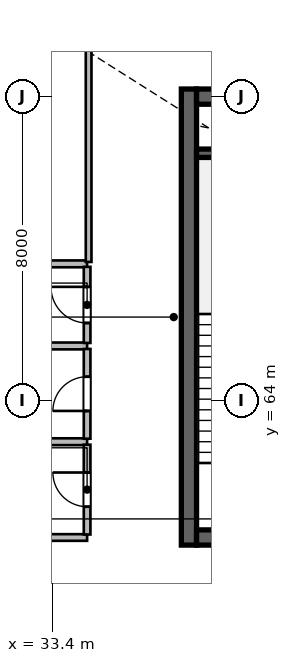
"""IFC4 building model, lengths in metres.
Left out: names, types, materials, properties, quantities, classifications, styles, units other than length and angle.
Written with IfcOpenShell. Run it as: python <this file> out.ifc"""

import sys

from ifc_helpers import new_model, si_unit, direction, frame, frame_2d, origin, place, context, subcontext, project, spatial, rectangle, extrude, source, transform, mapped, element, fill, save


model = new_model("IFC4")
c1 = context("Model", 3, precision=1e-05, world=origin(), true_north=direction((0.0, 1.0)))
c2 = subcontext(c1, "Body", "Model", "MODEL_VIEW")
j1 = project(units=[si_unit("LENGTHUNIT", "METRE"), si_unit("PLANEANGLEUNIT", "RADIAN")], contexts=[c1])
p1 = place(None, origin())
s1 = spatial("IfcSite", under=j1, at=p1, CompositionType="ELEMENT")
p2 = place(p1, origin())
s2 = spatial("IfcBuilding", under=s1, at=p2, CompositionType="ELEMENT")
p3 = place(p2, frame((0.0, 0.0, 312.6)))
s3 = spatial("IfcBuildingStorey", under=s2, at=p3, CompositionType="ELEMENT", Elevation=312.6)
m1 = source(origin(), c2, "Body", "SweptSolid", [
    extrude(rectangle(XDim=12.0, YDim=0.4, at=frame_2d((6.0, 0.0))), origin(), (0.0, 0.0, 1.0), 5.4),
])
p4 = place(p3, frame((37.0, 60.2, 0.0), z_axis=(0.0, 0.0, 1.0), x_axis=(0.0, 1.0, 0.0)))
e1 = element("IfcWall", 1, at=p4, inside=s3, PredefinedType="SHEAR", context=c2, shape_type="MappedRepresentation", body=[
    mapped(m1, transform((0.0, 0.0, 0.0), scale=1.0)),
])
m2 = source(origin(), c2, "Body", "SweptSolid", [
    extrude(rectangle(XDim=21.6, YDim=0.4, at=frame_2d((10.8, 0.0))), origin(), (0.0, 0.0, 1.0), 5.4),
])
p5 = place(p3, frame((37.2, 60.4, 0.0), z_axis=(0.0, 0.0, 1.0), x_axis=(1.0, 0.0, 0.0)))
e2 = element("IfcWall", 2, at=p5, inside=s3, PredefinedType="SHEAR", context=c2, shape_type="MappedRepresentation", body=[
    mapped(m2, transform((0.0, 0.0, 0.0), scale=1.0)),
])
p6 = place(p5, frame((1.1, 0.0, 0.0)))
e3 = element("IfcOpeningElement", 3, at=p6, cuts=e2, PredefinedType="OPENING", context=c2, shape_type="SweptSolid", body=[
    extrude(rectangle(XDim=1.15, YDim=2.15, at=frame_2d((0.575, 1.075))), frame((0.0, 0.21, 0.0), z_axis=(0.0, -1.0, 0.0), x_axis=(1.0, 0.0, 0.0)), (0.0, 0.0, 1.0), 0.42),
])
p7 = place(p5, frame((19.5, 0.0, 0.0)))
e4 = element("IfcOpeningElement", 4, at=p7, cuts=e2, PredefinedType="OPENING", context=c2, shape_type="SweptSolid", body=[
    extrude(rectangle(XDim=0.9, YDim=2.1, at=frame_2d((0.45, 1.05))), frame((0.0, 0.21, 0.0), z_axis=(0.0, -1.0, 0.0), x_axis=(1.0, 0.0, 0.0)), (0.0, 0.0, 1.0), 0.42),
])
p8 = place(p5, frame((12.02, 0.0, 0.0)))
e5 = element("IfcOpeningElement", 5, at=p8, cuts=e2, PredefinedType="OPENING", context=c2, shape_type="SweptSolid", body=[
    extrude(rectangle(XDim=1.6, YDim=2.15, at=frame_2d((0.8, 1.075))), frame((0.0, 0.21, 0.0), z_axis=(0.0, -1.0, 0.0), x_axis=(1.0, 0.0, 0.0)), (0.0, 0.0, 1.0), 0.42),
])
p9 = place(p3, frame((37.2, 72.0, 0.0), z_axis=(0.0, 0.0, 1.0), x_axis=(1.0, 0.0, 0.0)))
e6 = element("IfcWall", 6, at=p9, inside=s3, PredefinedType="SHEAR", context=c2, shape_type="MappedRepresentation", body=[
    mapped(m2, transform((0.0, 0.0, 0.0), scale=1.0)),
])
p10 = place(p9, frame((1.2, 0.0, 0.0)))
e7 = element("IfcOpeningElement", 7, at=p10, cuts=e6, PredefinedType="OPENING", context=c2, shape_type="SweptSolid", body=[
    extrude(rectangle(XDim=0.9, YDim=2.1, at=frame_2d((0.45, 1.05))), frame((0.0, 0.21, 0.0), z_axis=(0.0, -1.0, 0.0), x_axis=(1.0, 0.0, 0.0)), (0.0, 0.0, 1.0), 0.42),
])
p11 = place(p9, frame((14.7, 0.0, 0.0)))
e8 = element("IfcOpeningElement", 8, at=p11, cuts=e6, PredefinedType="OPENING", context=c2, shape_type="SweptSolid", body=[
    extrude(rectangle(XDim=1.2, YDim=2.15, at=frame_2d((0.6, 1.075))), frame((0.0, 0.21, 0.0), z_axis=(0.0, -1.0, 0.0), x_axis=(1.0, 0.0, 0.0)), (0.0, 0.0, 1.0), 0.42),
])
p12 = place(p9, frame((4.15, 0.0, 0.0)))
e9 = element("IfcOpeningElement", 9, at=p12, cuts=e6, PredefinedType="OPENING", context=c2, shape_type="SweptSolid", body=[
    extrude(rectangle(XDim=1.3, YDim=2.15, at=frame_2d((0.65, 1.075))), frame((0.0, 0.21, 0.0), z_axis=(0.0, -1.0, 0.0), x_axis=(1.0, 0.0, 0.0)), (0.0, 0.0, 1.0), 0.42),
])
p13 = place(p9, frame((7.25, 0.0, 0.0)))
e10 = element("IfcOpeningElement", 10, at=p13, cuts=e6, PredefinedType="OPENING", context=c2, shape_type="SweptSolid", body=[
    extrude(rectangle(XDim=0.9, YDim=2.1, at=frame_2d((0.45, 1.05))), frame((0.0, 0.21, 0.0), z_axis=(0.0, -1.0, 0.0), x_axis=(1.0, 0.0, 0.0)), (0.0, 0.0, 1.0), 0.42),
])
m3 = source(origin(), c2, "Body", "SweptSolid", [
    extrude(rectangle(XDim=3.27, YDim=0.22, at=frame_2d((1.635, 0.0))), origin(), (0.0, 0.0, 1.0), 5.4),
])
p14 = place(p3, frame((37.2, 70.51, 0.0), z_axis=(0.0, 0.0, 1.0), x_axis=(1.0, 0.0, 0.0)))
e11 = element("IfcWall", 11, at=p14, inside=s3, PredefinedType="SHEAR", context=c2, shape_type="MappedRepresentation", body=[
    mapped(m3, transform((0.0, 0.0, 0.0), scale=1.0)),
])
m4 = source(origin(), c2, "Body", "SweptSolid", [
    extrude(rectangle(XDim=3.52, YDim=0.175, at=frame_2d((1.76, 0.0))), origin(), (0.0, 0.0, 1.0), 5.12),
])
p15 = place(p3, frame((30.8, 60.4, 0.0), z_axis=(0.0, 0.0, 1.0), x_axis=(1.0, 0.0, 0.0)))
e12 = element("IfcWall", 12, at=p15, inside=s3, PredefinedType="PARTITIONING", context=c2, shape_type="MappedRepresentation", body=[
    mapped(m4, transform((0.0, 0.0, 0.0), scale=1.0)),
])
m5 = source(origin(), c2, "Body", "SweptSolid", [
    extrude(rectangle(XDim=3.52, YDim=0.18, at=frame_2d((1.76, 0.0))), origin(), (0.0, 0.0, 1.0), 5.12),
])
p16 = place(p3, frame((30.8, 62.92, 0.0), z_axis=(0.0, 0.0, 1.0), x_axis=(1.0, 0.0, 0.0)))
e13 = element("IfcWall", 13, at=p16, inside=s3, PredefinedType="PLUMBINGWALL", context=c2, shape_type="MappedRepresentation", body=[
    mapped(m5, transform((0.0, 0.0, 0.0), scale=1.0)),
])
m6 = source(origin(), c2, "Body", "SweptSolid", [
    extrude(rectangle(XDim=2.363, YDim=0.175, at=frame_2d((1.181, 0.0))), origin(), (0.0, 0.0, 1.0), 5.12),
])
p17 = place(p3, frame((34.32, 60.479, 0.0), z_axis=(0.0, 0.0, 1.0), x_axis=(0.0, 1.0, 0.0)))
e14 = element("IfcWall", 14, at=p17, inside=s3, PredefinedType="PARTITIONING", context=c2, shape_type="MappedRepresentation", body=[
    mapped(m6, transform((0.0, 0.0, 0.0), scale=1.0)),
])
p18 = place(p17, frame((0.731, 0.0, 0.0)))
e15 = element("IfcOpeningElement", 15, at=p18, cuts=e14, PredefinedType="OPENING", context=c2, shape_type="SweptSolid", body=[
    extrude(rectangle(XDim=0.9, YDim=2.08, at=frame_2d((0.45, 1.04))), frame((0.0, 0.098, 0.0), z_axis=(0.0, -1.0, 0.0), x_axis=(1.0, 0.0, 0.0)), (0.0, 0.0, 1.0), 0.195),
])
p19 = place(p3, frame((30.8, 65.44, 0.0), z_axis=(0.0, 0.0, 1.0), x_axis=(1.0, 0.0, 0.0)))
e16 = element("IfcWall", 16, at=p19, inside=s3, PredefinedType="PLUMBINGWALL", context=c2, shape_type="MappedRepresentation", body=[
    mapped(m5, transform((0.0, 0.0, 0.0), scale=1.0)),
])
m7 = source(origin(), c2, "Body", "SweptSolid", [
    extrude(rectangle(XDim=2.362, YDim=0.175, at=frame_2d((1.181, 0.0))), origin(), (0.0, 0.0, 1.0), 5.12),
])
p20 = place(p3, frame((34.32, 62.999, 0.0), z_axis=(0.0, 0.0, 1.0), x_axis=(0.0, 1.0, 0.0)))
e17 = element("IfcWall", 17, at=p20, inside=s3, PredefinedType="PARTITIONING", context=c2, shape_type="MappedRepresentation", body=[
    mapped(m7, transform((0.0, 0.0, 0.0), scale=1.0)),
])
p21 = place(p20, frame((0.731, 0.0, 0.0)))
e18 = element("IfcOpeningElement", 18, at=p21, cuts=e17, PredefinedType="OPENING", context=c2, shape_type="SweptSolid", body=[
    extrude(rectangle(XDim=0.9, YDim=2.08, at=frame_2d((0.45, 1.04))), frame((0.0, 0.098, 0.0), z_axis=(0.0, -1.0, 0.0), x_axis=(1.0, 0.0, 0.0)), (0.0, 0.0, 1.0), 0.195),
])
p22 = place(p3, frame((30.8, 67.6, 0.0), z_axis=(0.0, 0.0, 1.0), x_axis=(1.0, 0.0, 0.0)))
e19 = element("IfcWall", 19, at=p22, inside=s3, PredefinedType="PLUMBINGWALL", context=c2, shape_type="MappedRepresentation", body=[
    mapped(m5, transform((0.0, 0.0, 0.0), scale=1.0)),
])
m8 = source(origin(), c2, "Body", "SweptSolid", [
    extrude(rectangle(XDim=2.002, YDim=0.175, at=frame_2d((1.001, 0.0))), origin(), (0.0, 0.0, 1.0), 5.12),
])
p23 = place(p3, frame((34.32, 65.519, 0.0), z_axis=(0.0, 0.0, 1.0), x_axis=(0.0, 1.0, 0.0)))
e20 = element("IfcWall", 20, at=p23, inside=s3, PredefinedType="PARTITIONING", context=c2, shape_type="MappedRepresentation", body=[
    mapped(m8, transform((0.0, 0.0, 0.0), scale=1.0)),
])
p24 = place(p23, frame((0.526, 0.0, 0.0)))
e21 = element("IfcOpeningElement", 21, at=p24, cuts=e20, PredefinedType="OPENING", context=c2, shape_type="SweptSolid", body=[
    extrude(rectangle(XDim=0.95, YDim=2.12, at=frame_2d((0.475, 1.06))), frame((0.0, 0.098, 0.0), z_axis=(0.0, -1.0, 0.0), x_axis=(1.0, 0.0, 0.0)), (0.0, 0.0, 1.0), 0.195),
])
m9 = source(origin(), c2, "Body", "SweptSolid", [
    extrude(rectangle(XDim=6.862, YDim=0.15, at=frame_2d((3.431, 0.0))), origin(), (0.0, 0.0, 1.0), 5.12),
])
p25 = place(p3, frame((34.36, 67.65, 0.0), z_axis=(0.0, 0.0, 1.0), x_axis=(0.0, 1.0, 0.0)))
e22 = element("IfcWall", 22, at=p25, inside=s3, PredefinedType="PARTITIONING", context=c2, shape_type="MappedRepresentation", body=[
    mapped(m9, transform((0.0, 0.0, 0.0), scale=1.0)),
])
m10 = source(origin(), c2, "Body", "SweptSolid", [
    extrude(rectangle(XDim=0.9, YDim=2.08, at=frame_2d((0.45, 1.04))), frame((0.0, 0.025, 0.0), z_axis=(0.0, -1.0, 0.0), x_axis=(1.0, 0.0, 0.0)), (0.0, 0.0, 1.0), 0.05),
])
p26 = place(p18, origin())
e23 = element("IfcDoor", 23, at=p26, inside=s3, OperationType="SINGLE_SWING_RIGHT", PredefinedType="DOOR", context=c2, shape_type="MappedRepresentation", body=[
    mapped(m10, transform((0.0, 0.0, 0.0), scale=1.0)),
])
fill(e15, e23)
p27 = place(p21, origin())
e24 = element("IfcDoor", 24, at=p27, inside=s3, OperationType="SINGLE_SWING_LEFT", PredefinedType="DOOR", context=c2, shape_type="MappedRepresentation", body=[
    mapped(m10, transform((0.0, 0.0, 0.0), scale=1.0)),
])
fill(e18, e24)
m11 = source(origin(), c2, "Body", "SweptSolid", [
    extrude(rectangle(XDim=0.95, YDim=2.12, at=frame_2d((0.475, 1.06))), frame((0.0, 0.025, 0.0), z_axis=(0.0, -1.0, 0.0), x_axis=(1.0, 0.0, 0.0)), (0.0, 0.0, 1.0), 0.05),
])
p28 = place(p24, origin())
e25 = element("IfcDoor", 25, at=p28, inside=s3, OperationType="SINGLE_SWING_RIGHT", PredefinedType="DOOR", context=c2, shape_type="MappedRepresentation", body=[
    mapped(m11, transform((0.0, 0.0, 0.0), scale=1.0)),
])
fill(e21, e25)
save(model, sys.argv[1])
